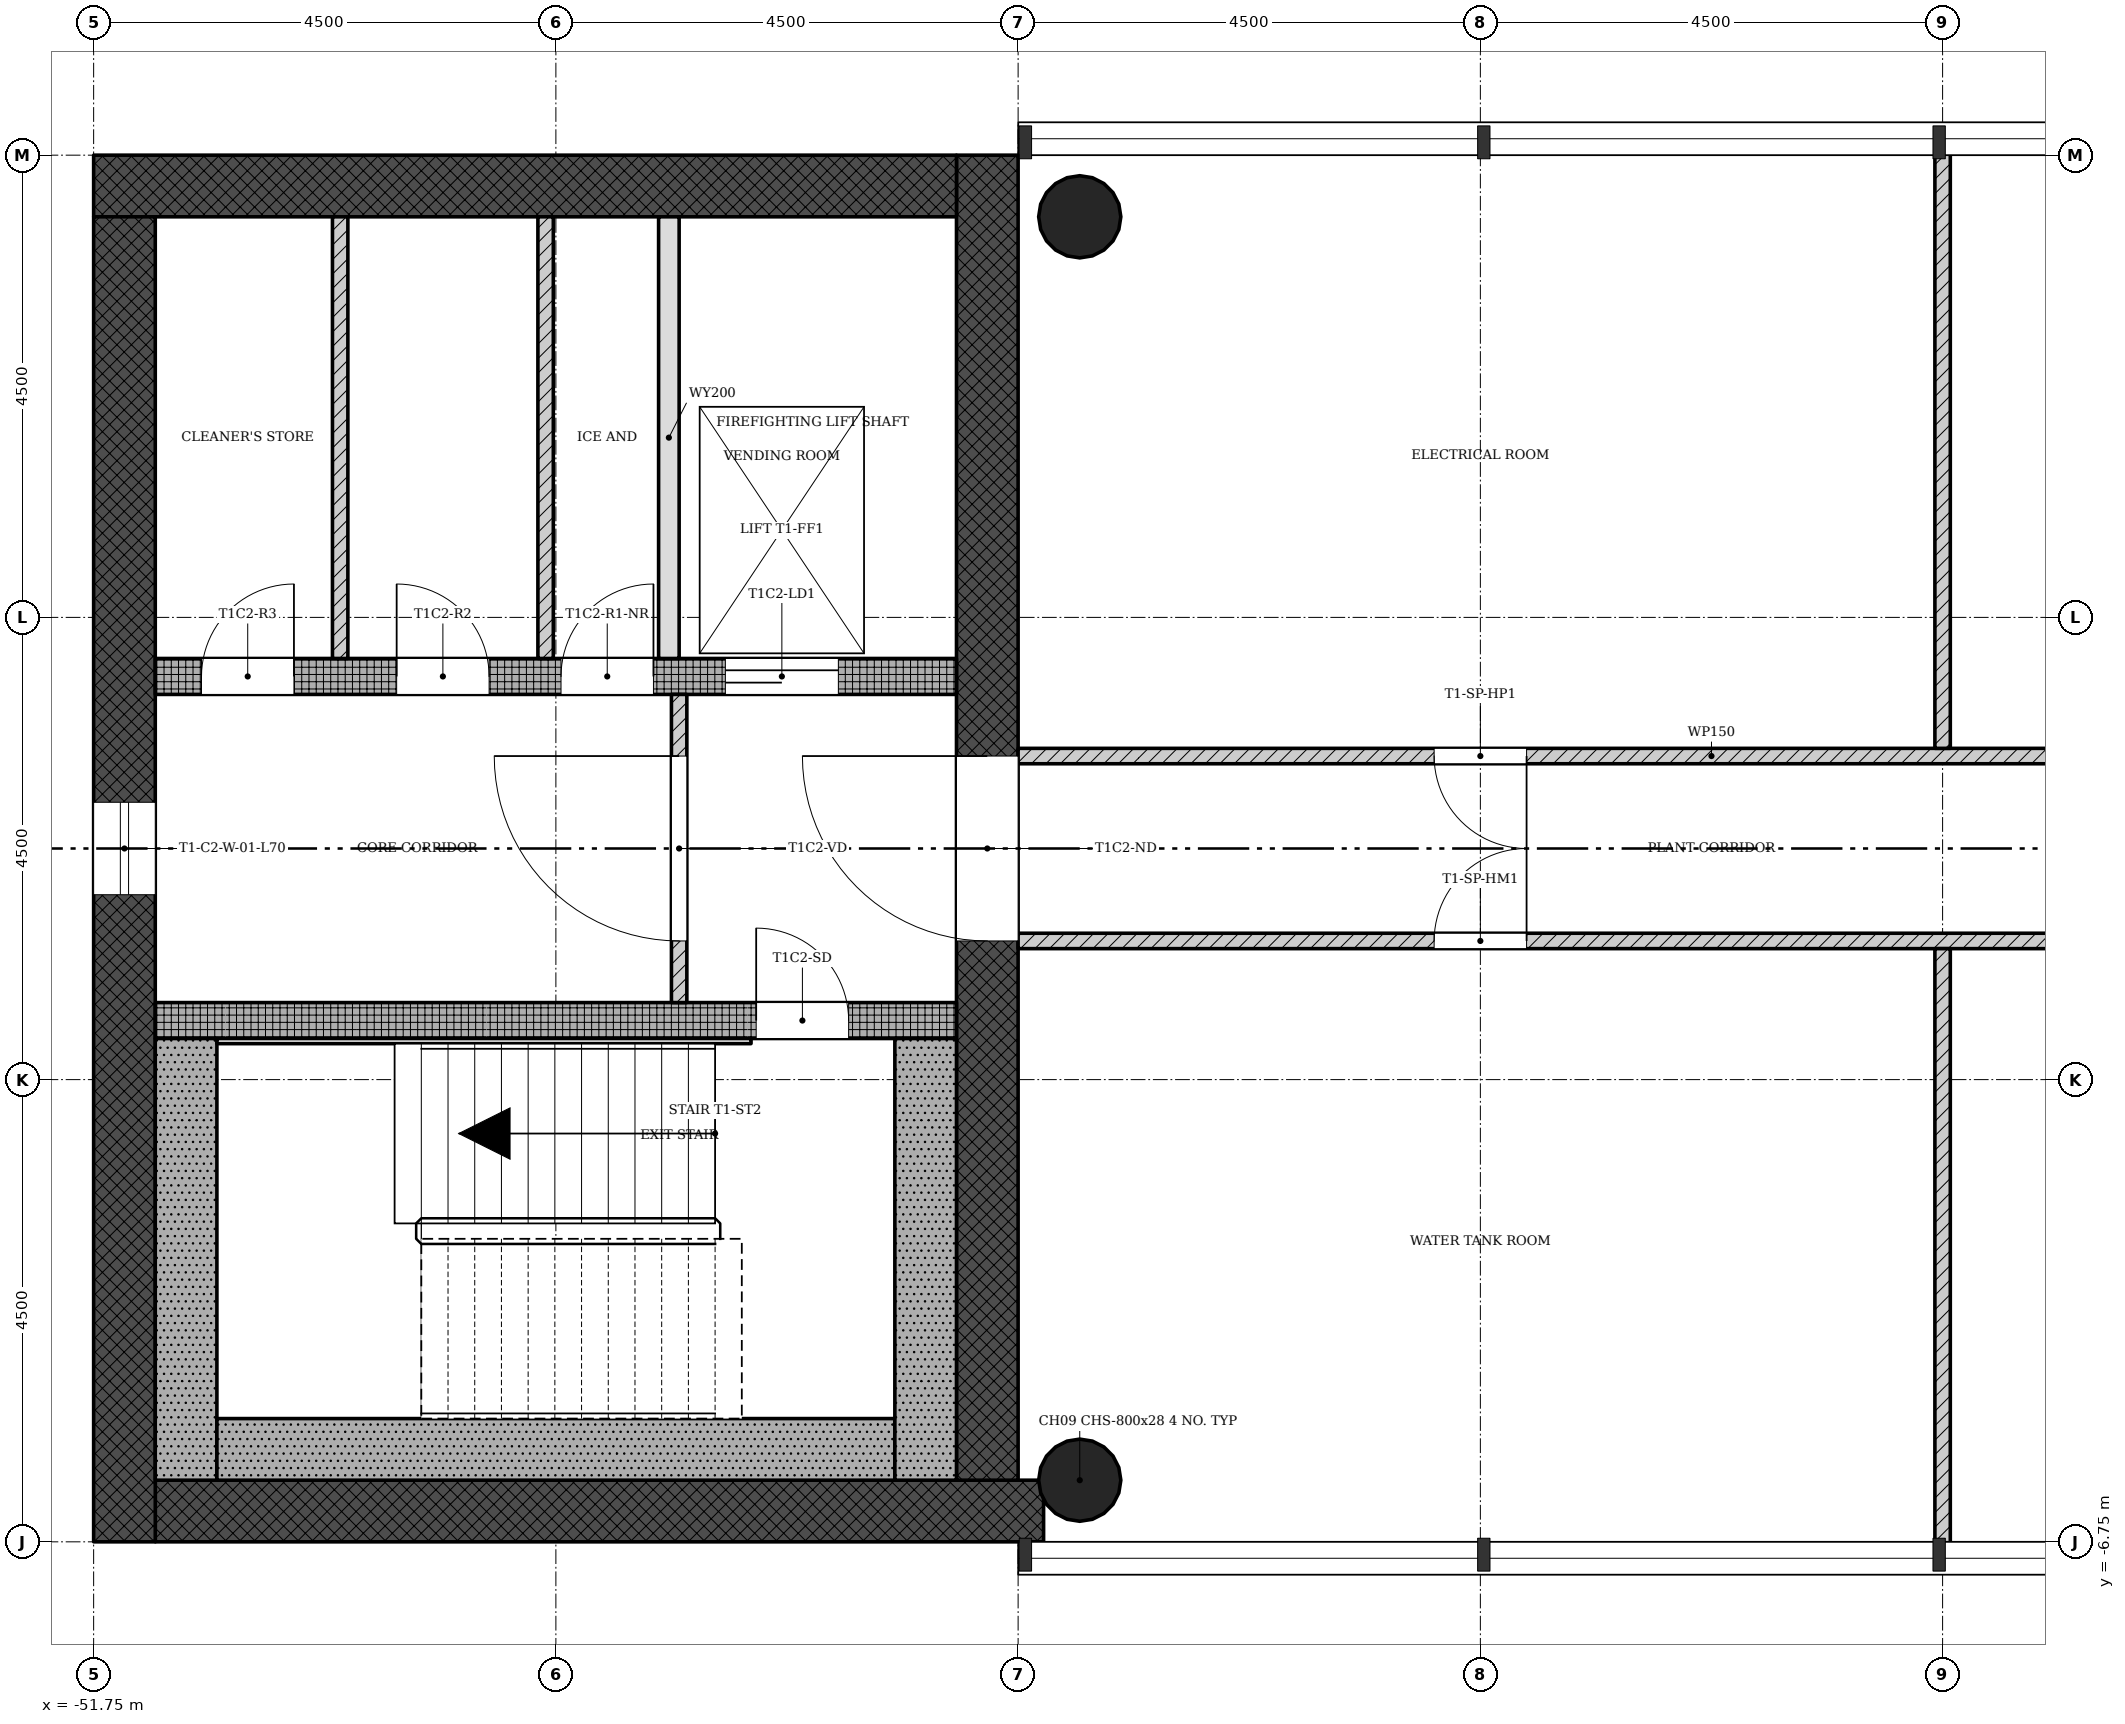
"""IFC4 building model, lengths in metres.
Left out: names, types, materials, properties, quantities, classifications, styles, units other than length and angle.
Written with IfcOpenShell. Run it as: python <this file> out.ifc"""

import sys

from ifc_helpers import new_model, si_unit, direction, frame, frame_2d, origin, origin_2d, place, context, subcontext, project, spatial, rectangle, hollow_circle, extrude, element, fill, save


model = new_model("IFC4")
c1 = context("Model", 3, precision=1e-05, world=origin(), true_north=direction((0.0, 1.0)))
c2 = subcontext(c1, "Body", "Model", "MODEL_VIEW")
j1 = project(units=[si_unit("LENGTHUNIT", "METRE"), si_unit("PLANEANGLEUNIT", "RADIAN")], contexts=[c1])
p1 = place(None, origin())
s1 = spatial("IfcSite", under=j1, at=p1, CompositionType="ELEMENT")
p2 = place(p1, origin())
s2 = spatial("IfcBuilding", under=s1, at=p2, CompositionType="ELEMENT")
p3 = place(p2, frame((0.0, 0.0, 255.9)))
s3 = spatial("IfcBuildingStorey", under=s2, at=p3, CompositionType="ELEMENT", Elevation=255.9)
p4 = place(p3, frame((-51.15, -6.45, 0.0), z_axis=(0.0, 0.0, 1.0), x_axis=(1.0, 0.0, 0.0)))
e1 = element("IfcWall", 1, at=p4, inside=s3, PredefinedType="SHEAR", context=c2, shape_type="SweptSolid", body=[
    extrude(rectangle(XDim=8.648, YDim=0.6, at=frame_2d((4.324, 0.0))), origin(), (0.0, 0.0, 1.0), 4.5),
])
p5 = place(p3, frame((-43.05, -6.15, 0.0), z_axis=(0.0, 0.0, 1.0), x_axis=(0.0, 1.0, 0.0)))
e2 = element("IfcWall", 2, at=p5, inside=s3, PredefinedType="SHEAR", context=c2, shape_type="SweptSolid", body=[
    extrude(rectangle(XDim=12.9, YDim=0.6, at=frame_2d((6.45, 0.0))), origin(), (0.0, 0.0, 1.0), 4.5),
])
p6 = place(p5, frame((5.25, 0.0, 0.0)))
e3 = element("IfcOpeningElement", 3, at=p6, cuts=e2, PredefinedType="OPENING", context=c2, shape_type="SweptSolid", body=[
    extrude(rectangle(XDim=1.8, YDim=2.1, at=frame_2d((0.9, 1.05))), frame((0.0, 0.31, 0.0), z_axis=(0.0, -1.0, 0.0), x_axis=(1.0, 0.0, 0.0)), (0.0, 0.0, 1.0), 0.62),
])
p7 = place(p3, frame((-43.35, 6.45, 0.0), z_axis=(0.0, 0.0, 1.0), x_axis=(-1.0, 0.0, 0.0)))
e4 = element("IfcWall", 4, at=p7, inside=s3, PredefinedType="SHEAR", context=c2, shape_type="SweptSolid", body=[
    extrude(rectangle(XDim=8.4, YDim=0.6, at=frame_2d((4.2, 0.0))), origin(), (0.0, 0.0, 1.0), 4.5),
])
p8 = place(p3, frame((-51.45, 6.15, 0.0), z_axis=(0.0, 0.0, 1.0), x_axis=(0.0, -1.0, 0.0)))
e5 = element("IfcWall", 5, at=p8, inside=s3, PredefinedType="SHEAR", context=c2, shape_type="SweptSolid", body=[
    extrude(rectangle(XDim=12.9, YDim=0.6, at=frame_2d((6.45, 0.0))), origin(), (0.0, 0.0, 1.0), 4.5),
])
p9 = place(p8, frame((5.7, 0.0, 0.45)))
e6 = element("IfcOpeningElement", 6, at=p9, cuts=e5, PredefinedType="OPENING", context=c2, shape_type="SweptSolid", body=[
    extrude(rectangle(XDim=0.9, YDim=2.4, at=frame_2d((0.45, 1.2))), frame((0.0, 0.31, 0.0), z_axis=(0.0, -1.0, 0.0), x_axis=(1.0, 0.0, 0.0)), (0.0, 0.0, 1.0), 0.62),
])
p10 = place(p3, frame((-51.15, -1.675, 0.0), z_axis=(0.0, 0.0, 1.0), x_axis=(1.0, 0.0, 0.0)))
e7 = element("IfcWall", 7, at=p10, inside=s3, PredefinedType="SHEAR", context=c2, shape_type="SweptSolid", body=[
    extrude(rectangle(XDim=7.8, YDim=0.35, at=frame_2d((3.9, 0.0))), origin(), (0.0, 0.0, 1.0), 4.5),
])
p11 = place(p10, frame((5.85, 0.0, 0.0)))
e8 = element("IfcOpeningElement", 8, at=p11, cuts=e7, PredefinedType="OPENING", context=c2, shape_type="SweptSolid", body=[
    extrude(rectangle(XDim=0.9, YDim=2.1, at=frame_2d((0.45, 1.05))), frame((0.0, 0.185, 0.0), z_axis=(0.0, -1.0, 0.0), x_axis=(1.0, 0.0, 0.0)), (0.0, 0.0, 1.0), 0.37),
])
p12 = place(p3, frame((-51.15, 1.675, 0.0), z_axis=(0.0, 0.0, 1.0), x_axis=(1.0, 0.0, 0.0)))
e9 = element("IfcWall", 9, at=p12, inside=s3, PredefinedType="SHEAR", context=c2, shape_type="SweptSolid", body=[
    extrude(rectangle(XDim=7.8, YDim=0.35, at=frame_2d((3.9, 0.0))), origin(), (0.0, 0.0, 1.0), 4.5),
])
p13 = place(p12, frame((5.55, 0.0, 0.0)))
e10 = element("IfcOpeningElement", 10, at=p13, cuts=e9, PredefinedType="OPENING", context=c2, shape_type="SweptSolid", body=[
    extrude(rectangle(XDim=1.1, YDim=2.1, at=frame_2d((0.55, 1.05))), frame((0.0, 0.185, 0.0), z_axis=(0.0, -1.0, 0.0), x_axis=(1.0, 0.0, 0.0)), (0.0, 0.0, 1.0), 0.37),
])
p14 = place(p12, frame((3.95, 0.0, 0.0)))
e11 = element("IfcOpeningElement", 11, at=p14, cuts=e9, PredefinedType="OPENING", context=c2, shape_type="SweptSolid", body=[
    extrude(rectangle(XDim=0.9, YDim=2.1, at=frame_2d((0.45, 1.05))), frame((0.0, 0.185, 0.0), z_axis=(0.0, -1.0, 0.0), x_axis=(1.0, 0.0, 0.0)), (0.0, 0.0, 1.0), 0.37),
])
p15 = place(p12, frame((2.35, 0.0, 0.0)))
e12 = element("IfcOpeningElement", 12, at=p15, cuts=e9, PredefinedType="OPENING", context=c2, shape_type="SweptSolid", body=[
    extrude(rectangle(XDim=0.9, YDim=2.1, at=frame_2d((0.45, 1.05))), frame((0.0, 0.185, 0.0), z_axis=(0.0, -1.0, 0.0), x_axis=(1.0, 0.0, 0.0)), (0.0, 0.0, 1.0), 0.37),
])
p16 = place(p12, frame((0.45, 0.0, 0.0)))
e13 = element("IfcOpeningElement", 13, at=p16, cuts=e9, PredefinedType="OPENING", context=c2, shape_type="SweptSolid", body=[
    extrude(rectangle(XDim=0.9, YDim=2.1, at=frame_2d((0.45, 1.05))), frame((0.0, 0.185, 0.0), z_axis=(0.0, -1.0, 0.0), x_axis=(1.0, 0.0, 0.0)), (0.0, 0.0, 1.0), 0.37),
])
for number, where, z_axis, x_axis in (
    (14, (-42.15, -6.15, 0.0), (0.0, 0.0, 1.0), (1.0, 0.0, 0.0)),
    (15, (-42.15, 6.15, 0.0), (0.0, 0.0, 1.0), (1.0, 0.0, 0.0)),
):
    element("IfcColumn", number, at=place(p3, frame(where, z_axis=z_axis, x_axis=x_axis)), inside=s3, PredefinedType="COLUMN", context=c2, shape_type="SweptSolid", body=[
        extrude(hollow_circle(Radius=0.4, WallThickness=0.028, at=origin_2d()), origin(), (0.0, 0.0, 1.0), 4.5),
    ])
p17 = place(p3, frame((-46.05, 1.5, 0.0), z_axis=(0.0, 0.0, 1.0), x_axis=(0.0, -1.0, 0.0)))
e16 = element("IfcWall", 16, at=p17, inside=s3, PredefinedType="PARTITIONING", context=c2, shape_type="SweptSolid", body=[
    extrude(rectangle(XDim=3.0, YDim=0.15, at=frame_2d((1.5, 0.0))), origin(), (0.0, 0.0, 1.0), 4.1),
])
p18 = place(p17, frame((0.6, 0.0, 0.0)))
e17 = element("IfcOpeningElement", 17, at=p18, cuts=e16, PredefinedType="OPENING", context=c2, shape_type="SweptSolid", body=[
    extrude(rectangle(XDim=1.8, YDim=2.1, at=frame_2d((0.9, 1.05))), frame((0.0, 0.085, 0.0), z_axis=(0.0, -1.0, 0.0), x_axis=(1.0, 0.0, 0.0)), (0.0, 0.0, 1.0), 0.17),
])
p19 = place(p3, frame((-46.15, 6.15, 0.0), z_axis=(0.0, 0.0, 1.0), x_axis=(0.0, -1.0, 0.0)))
e18 = element("IfcWall", 18, at=p19, inside=s3, PredefinedType="SOLIDWALL", context=c2, shape_type="SweptSolid", body=[
    extrude(rectangle(XDim=4.3, YDim=0.2, at=frame_2d((2.15, 0.0))), origin(), (0.0, 0.0, 1.0), 4.1),
])
for number, where, z_axis, x_axis in (
    (19, (-47.35, 6.15, 0.0), (0.0, 0.0, 1.0), (0.0, -1.0, 0.0)),
    (20, (-49.35, 6.15, 0.0), (0.0, 0.0, 1.0), (0.0, -1.0, 0.0)),
):
    element("IfcWall", number, at=place(p3, frame(where, z_axis=z_axis, x_axis=x_axis)), inside=s3, PredefinedType="PARTITIONING", context=c2, shape_type="SweptSolid", body=[
        extrude(rectangle(XDim=4.3, YDim=0.15, at=frame_2d((2.15, 0.0))), origin(), (0.0, 0.0, 1.0), 4.1),
    ])
p20 = place(p3, frame((-42.75, 0.9, 0.0), z_axis=(0.0, 0.0, 1.0), x_axis=(1.0, 0.0, 0.0)))
e21 = element("IfcWall", 21, at=p20, inside=s3, PredefinedType="PARTITIONING", context=c2, shape_type="SweptSolid", body=[
    extrude(rectangle(XDim=13.5, YDim=0.15, at=frame_2d((6.75, 0.0))), origin(), (0.0, 0.0, 1.0), 4.1),
])
p21 = place(p20, frame((4.05, 0.0, 0.0)))
e22 = element("IfcOpeningElement", 22, at=p21, cuts=e21, PredefinedType="OPENING", context=c2, shape_type="SweptSolid", body=[
    extrude(rectangle(XDim=0.9, YDim=2.1, at=frame_2d((0.45, 1.05))), frame((0.0, 0.085, 0.0), z_axis=(0.0, -1.0, 0.0), x_axis=(1.0, 0.0, 0.0)), (0.0, 0.0, 1.0), 0.17),
])
p22 = place(p20, frame((10.8, 0.0, 0.0)))
e23 = element("IfcOpeningElement", 23, at=p22, cuts=e21, PredefinedType="OPENING", context=c2, shape_type="SweptSolid", body=[
    extrude(rectangle(XDim=0.9, YDim=2.1, at=frame_2d((0.45, 1.05))), frame((0.0, 0.085, 0.0), z_axis=(0.0, -1.0, 0.0), x_axis=(1.0, 0.0, 0.0)), (0.0, 0.0, 1.0), 0.17),
])
p23 = place(p3, frame((-33.75, 0.975, 0.0), z_axis=(0.0, 0.0, 1.0), x_axis=(0.0, 1.0, 0.0)))
e24 = element("IfcWall", 24, at=p23, inside=s3, PredefinedType="PARTITIONING", context=c2, shape_type="SweptSolid", body=[
    extrude(rectangle(XDim=5.875, YDim=0.15, at=frame_2d((2.938, 0.0))), origin(), (0.0, 0.0, 1.0), 4.1),
])
p24 = place(p3, frame((-42.75, -0.9, 0.0), z_axis=(0.0, 0.0, 1.0), x_axis=(1.0, 0.0, 0.0)))
e25 = element("IfcWall", 25, at=p24, inside=s3, PredefinedType="PARTITIONING", context=c2, shape_type="SweptSolid", body=[
    extrude(rectangle(XDim=13.5, YDim=0.15, at=frame_2d((6.75, 0.0))), origin(), (0.0, 0.0, 1.0), 4.1),
])
p25 = place(p24, frame((4.05, 0.0, 0.0)))
e26 = element("IfcOpeningElement", 26, at=p25, cuts=e25, PredefinedType="OPENING", context=c2, shape_type="SweptSolid", body=[
    extrude(rectangle(XDim=0.9, YDim=2.1, at=frame_2d((0.45, 1.05))), frame((0.0, 0.085, 0.0), z_axis=(0.0, -1.0, 0.0), x_axis=(1.0, 0.0, 0.0)), (0.0, 0.0, 1.0), 0.17),
])
p26 = place(p24, frame((10.8, 0.0, 0.0)))
e27 = element("IfcOpeningElement", 27, at=p26, cuts=e25, PredefinedType="OPENING", context=c2, shape_type="SweptSolid", body=[
    extrude(rectangle(XDim=0.9, YDim=2.1, at=frame_2d((0.45, 1.05))), frame((0.0, 0.085, 0.0), z_axis=(0.0, -1.0, 0.0), x_axis=(1.0, 0.0, 0.0)), (0.0, 0.0, 1.0), 0.17),
])
p27 = place(p3, frame((-33.75, -0.975, 0.0), z_axis=(0.0, 0.0, 1.0), x_axis=(0.0, -1.0, 0.0)))
e28 = element("IfcWall", 28, at=p27, inside=s3, PredefinedType="PARTITIONING", context=c2, shape_type="SweptSolid", body=[
    extrude(rectangle(XDim=5.875, YDim=0.15, at=frame_2d((2.938, 0.0))), origin(), (0.0, 0.0, 1.0), 4.1),
])
p28 = place(p3, frame((-50.85, -1.85, 0.0), z_axis=(0.0, 0.0, 1.0), x_axis=(0.0, -1.0, 0.0)))
e29 = element("IfcWall", 29, at=p28, inside=s3, PredefinedType="SHEAR", context=c2, shape_type="SweptSolid", body=[
    extrude(rectangle(XDim=4.3, YDim=0.6, at=frame_2d((2.15, 0.0))), origin(), (0.0, 0.0, 1.0), 4.5),
])
p29 = place(p3, frame((-43.95, -5.85, 0.0), z_axis=(0.0, 0.0, 1.0), x_axis=(-1.0, 0.0, 0.0)))
e30 = element("IfcWall", 30, at=p29, inside=s3, PredefinedType="SHEAR", context=c2, shape_type="SweptSolid", body=[
    extrude(rectangle(XDim=6.6, YDim=0.6, at=frame_2d((3.3, 0.0))), origin(), (0.0, 0.0, 1.0), 4.5),
])
p30 = place(p3, frame((-43.65, -1.85, 0.0), z_axis=(0.0, 0.0, 1.0), x_axis=(0.0, -1.0, 0.0)))
e31 = element("IfcWall", 31, at=p30, inside=s3, PredefinedType="SHEAR", context=c2, shape_type="SweptSolid", body=[
    extrude(rectangle(XDim=4.3, YDim=0.6, at=frame_2d((2.15, 0.0))), origin(), (0.0, 0.0, 1.0), 4.5),
])
p31 = place(p3, frame((-45.35, -1.875, 0.0), z_axis=(0.0, 0.0, 1.0), x_axis=(-1.0, 0.0, 0.0)))
e32 = element("IfcWall", 32, at=p31, inside=s3, PredefinedType="SHEAR", context=c2, shape_type="SweptSolid", body=[
    extrude(rectangle(XDim=5.2, YDim=0.05, at=frame_2d((2.6, 0.0))), origin(), (0.0, 0.0, 1.0), 4.5),
])
p32 = place(p9, origin())
e33 = element("IfcWindow", 33, at=p32, inside=s3, PartitioningType="SINGLE_PANEL", PredefinedType="WINDOW", context=c2, shape_type="SweptSolid", body=[
    extrude(rectangle(XDim=0.9, YDim=2.4, at=frame_2d((0.45, 1.2))), frame((0.0, 0.03, 0.0), z_axis=(0.0, -1.0, 0.0), x_axis=(1.0, 0.0, 0.0)), (0.0, 0.0, 1.0), 0.06),
])
fill(e6, e33)
p33 = place(p18, origin())
e34 = element("IfcDoor", 34, at=p33, inside=s3, OperationType="SINGLE_SWING_LEFT", PredefinedType="DOOR", context=c2, shape_type="SweptSolid", body=[
    extrude(rectangle(XDim=1.8, YDim=2.1, at=frame_2d((0.9, 1.05))), frame((0.0, 0.025, 0.0), z_axis=(0.0, -1.0, 0.0), x_axis=(1.0, 0.0, 0.0)), (0.0, 0.0, 1.0), 0.05),
])
fill(e17, e34)
p34 = place(p21, origin())
e35 = element("IfcDoor", 35, at=p34, inside=s3, OperationType="SINGLE_SWING_RIGHT", PredefinedType="DOOR", context=c2, shape_type="SweptSolid", body=[
    extrude(rectangle(XDim=0.9, YDim=2.1, at=frame_2d((0.45, 1.05))), frame((0.0, 0.025, 0.0), z_axis=(0.0, -1.0, 0.0), x_axis=(1.0, 0.0, 0.0)), (0.0, 0.0, 1.0), 0.05),
])
fill(e22, e35)
p35 = place(p25, origin())
e36 = element("IfcDoor", 36, at=p35, inside=s3, OperationType="SINGLE_SWING_LEFT", PredefinedType="DOOR", context=c2, shape_type="SweptSolid", body=[
    extrude(rectangle(XDim=0.9, YDim=2.1, at=frame_2d((0.45, 1.05))), frame((0.0, 0.025, 0.0), z_axis=(0.0, -1.0, 0.0), x_axis=(1.0, 0.0, 0.0)), (0.0, 0.0, 1.0), 0.05),
])
fill(e26, e36)
p36 = place(p11, origin())
e37 = element("IfcDoor", 37, at=p36, inside=s3, OperationType="SINGLE_SWING_RIGHT", PredefinedType="DOOR", context=c2, shape_type="SweptSolid", body=[
    extrude(rectangle(XDim=0.9, YDim=2.1, at=frame_2d((0.45, 1.05))), frame((0.0, 0.025, 0.0), z_axis=(0.0, -1.0, 0.0), x_axis=(1.0, 0.0, 0.0)), (0.0, 0.0, 1.0), 0.05),
])
fill(e8, e37)
p37 = place(p13, origin())
e38 = element("IfcDoor", 38, at=p37, inside=s3, OperationType="SLIDING_TO_LEFT", PredefinedType="DOOR", context=c2, shape_type="SweptSolid", body=[
    extrude(rectangle(XDim=1.1, YDim=2.1, at=frame_2d((0.55, 1.05))), frame((0.0, 0.025, 0.0), z_axis=(0.0, -1.0, 0.0), x_axis=(1.0, 0.0, 0.0)), (0.0, 0.0, 1.0), 0.05),
])
fill(e10, e38)
p38 = place(p14, origin())
e39 = element("IfcDoor", 39, at=p38, inside=s3, OperationType="SINGLE_SWING_LEFT", PredefinedType="DOOR", context=c2, shape_type="SweptSolid", body=[
    extrude(rectangle(XDim=0.9, YDim=2.1, at=frame_2d((0.45, 1.05))), frame((0.0, 0.025, 0.0), z_axis=(0.0, -1.0, 0.0), x_axis=(1.0, 0.0, 0.0)), (0.0, 0.0, 1.0), 0.05),
])
fill(e11, e39)
p39 = place(p15, origin())
e40 = element("IfcDoor", 40, at=p39, inside=s3, OperationType="SINGLE_SWING_RIGHT", PredefinedType="DOOR", context=c2, shape_type="SweptSolid", body=[
    extrude(rectangle(XDim=0.9, YDim=2.1, at=frame_2d((0.45, 1.05))), frame((0.0, 0.025, 0.0), z_axis=(0.0, -1.0, 0.0), x_axis=(1.0, 0.0, 0.0)), (0.0, 0.0, 1.0), 0.05),
])
fill(e12, e40)
p40 = place(p16, origin())
e41 = element("IfcDoor", 41, at=p40, inside=s3, OperationType="SINGLE_SWING_LEFT", PredefinedType="DOOR", context=c2, shape_type="SweptSolid", body=[
    extrude(rectangle(XDim=0.9, YDim=2.1, at=frame_2d((0.45, 1.05))), frame((0.0, 0.025, 0.0), z_axis=(0.0, -1.0, 0.0), x_axis=(1.0, 0.0, 0.0)), (0.0, 0.0, 1.0), 0.05),
])
fill(e13, e41)
p41 = place(p6, origin())
e42 = element("IfcDoor", 42, at=p41, inside=s3, OperationType="SINGLE_SWING_LEFT", PredefinedType="DOOR", context=c2, shape_type="SweptSolid", body=[
    extrude(rectangle(XDim=1.8, YDim=2.1, at=frame_2d((0.9, 1.05))), frame((0.0, 0.025, 0.0), z_axis=(0.0, -1.0, 0.0), x_axis=(1.0, 0.0, 0.0)), (0.0, 0.0, 1.0), 0.05),
])
fill(e3, e42)
save(model, sys.argv[1])
